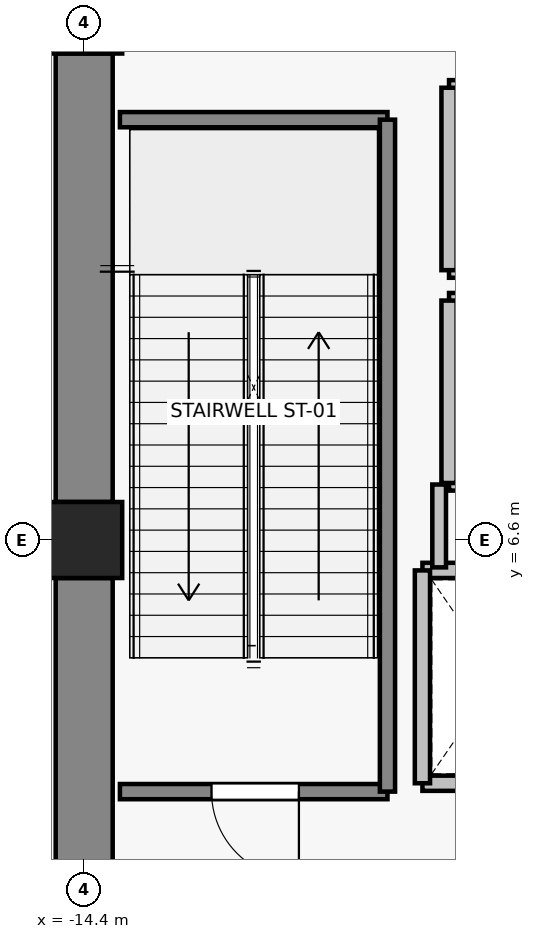
"""IFC4 building model, lengths in metres.
Left out: names, types, materials, properties, quantities, classifications, styles, units other than length and angle.
Written with IfcOpenShell. Run it as: python <this file> out.ifc"""

import sys

from ifc_helpers import new_model, si_unit, direction, frame, frame_2d, origin, origin_2d, place, context, subcontext, project, spatial, rectangle, extrude, source, transform, mapped, element, fill, save


model = new_model("IFC4")
c1 = context("Model", 3, precision=1e-05, world=origin(), true_north=direction((0.0, 1.0)))
c2 = subcontext(c1, "Body", "Model", "MODEL_VIEW")
j1 = project(units=[si_unit("LENGTHUNIT", "METRE"), si_unit("PLANEANGLEUNIT", "RADIAN")], contexts=[c1])
p1 = place(None, origin())
s1 = spatial("IfcSite", under=j1, at=p1, CompositionType="ELEMENT")
p2 = place(p1, origin())
s2 = spatial("IfcBuilding", under=s1, at=p2, CompositionType="ELEMENT")
p3 = place(p2, frame((0.0, 0.0, 80.2)))
s3 = spatial("IfcBuildingStorey", under=s2, at=p3, CompositionType="ELEMENT", Elevation=80.2)
for number, where, z_axis, x_axis in (
    (1, (-14.4, 6.6, 0.0), (0.0, 0.0, 1.0), (1.0, 0.0, 0.0)),
    (2, (-14.4, 13.5, 0.0), (0.0, 0.0, 1.0), (1.0, 0.0, 0.0)),
):
    element("IfcColumn", number, at=place(p3, frame(where, z_axis=z_axis, x_axis=x_axis)), inside=s3, PredefinedType="COLUMN", context=c2, shape_type="SweptSolid", body=[
        extrude(rectangle(XDim=1.0, YDim=1.0, at=origin_2d()), origin(), (0.0, 0.0, 1.0), 6.6),
    ])
p4 = place(p3, frame((-14.4, -0.7, 0.0), z_axis=(0.0, 0.0, 1.0), x_axis=(0.0, 1.0, 0.0)))
e3 = element("IfcWall", 3, at=p4, inside=s3, PredefinedType="SHEAR", context=c2, shape_type="SweptSolid", body=[
    extrude(rectangle(XDim=6.8, YDim=0.75, at=frame_2d((3.4, 0.0))), origin(), (0.0, 0.0, 1.0), 6.35),
])
p5 = place(p3, frame((-14.4, 7.1, 0.0), z_axis=(0.0, 0.0, 1.0), x_axis=(0.0, 1.0, 0.0)))
e4 = element("IfcWall", 4, at=p5, inside=s3, PredefinedType="SHEAR", context=c2, shape_type="SweptSolid", body=[
    extrude(rectangle(XDim=5.9, YDim=0.75, at=frame_2d((2.95, 0.0))), origin(), (0.0, 0.0, 1.0), 6.35),
])
p6 = place(p3, frame((-7.95, 3.4, 0.0), z_axis=(0.0, 0.0, 1.0), x_axis=(-1.0, 0.0, 0.0)))
e5 = element("IfcWall", 5, at=p6, inside=s3, PredefinedType="SOLIDWALL", context=c2, shape_type="SweptSolid", body=[
    extrude(rectangle(XDim=2.0, YDim=0.2, at=frame_2d((1.0, 0.0))), origin(), (0.0, 0.0, 1.0), 6.35),
])
p7 = place(p6, frame((0.45, 0.0, 0.0)))
e6 = element("IfcOpeningElement", 6, at=p7, cuts=e5, PredefinedType="OPENING", context=c2, shape_type="SweptSolid", body=[
    extrude(rectangle(XDim=1.1, YDim=2.2, at=frame_2d((0.55, 1.1))), frame((0.0, 0.11, 0.0), z_axis=(0.0, -1.0, 0.0), x_axis=(1.0, 0.0, 0.0)), (0.0, 0.0, 1.0), 0.22),
])
p8 = place(p3, frame((-9.95, 6.2, 0.0), z_axis=(0.0, 0.0, 1.0), x_axis=(1.0, 0.0, 0.0)))
e7 = element("IfcWall", 7, at=p8, inside=s3, PredefinedType="SOLIDWALL", context=c2, shape_type="SweptSolid", body=[
    extrude(rectangle(XDim=2.0, YDim=0.2, at=frame_2d((1.0, 0.0))), origin(), (0.0, 0.0, 1.0), 6.35),
])
p9 = place(p3, frame((-9.95, 3.4, 0.0), z_axis=(0.0, 0.0, 1.0), x_axis=(0.0, 1.0, 0.0)))
e8 = element("IfcWall", 8, at=p9, inside=s3, PredefinedType="SOLIDWALL", context=c2, shape_type="SweptSolid", body=[
    extrude(rectangle(XDim=2.8, YDim=0.2, at=frame_2d((1.4, 0.0))), origin(), (0.0, 0.0, 1.0), 6.35),
])
for number, where, z_axis, x_axis in (
    (9, (-7.4, 7.35, 0.0), (0.0, 0.0, 1.0), (-1.0, 0.0, 0.0)),
    (10, (-9.6, 9.75, 0.0), (0.0, 0.0, 1.0), (1.0, 0.0, 0.0)),
):
    element("IfcWall", number, at=place(p3, frame(where, z_axis=z_axis, x_axis=x_axis)), inside=s3, PredefinedType="SOLIDWALL", context=c2, shape_type="SweptSolid", body=[
        extrude(rectangle(XDim=2.2, YDim=0.2, at=frame_2d((1.1, 0.0))), origin(), (0.0, 0.0, 1.0), 5.79),
    ])
p10 = place(p3, frame((-9.6, 7.35, 0.0), z_axis=(0.0, 0.0, 1.0), x_axis=(0.0, 1.0, 0.0)))
e11 = element("IfcWall", 11, at=p10, inside=s3, PredefinedType="SOLIDWALL", context=c2, shape_type="SweptSolid", body=[
    extrude(rectangle(XDim=2.4, YDim=0.2, at=frame_2d((1.2, 0.0))), origin(), (0.0, 0.0, 1.0), 6.35),
])
for number, where, z_axis, x_axis in (
    (12, (-7.4, 10.15, 0.0), (0.0, 0.0, 1.0), (-1.0, 0.0, 0.0)),
    (13, (-9.6, 12.55, 0.0), (0.0, 0.0, 1.0), (1.0, 0.0, 0.0)),
):
    element("IfcWall", number, at=place(p3, frame(where, z_axis=z_axis, x_axis=x_axis)), inside=s3, PredefinedType="SOLIDWALL", context=c2, shape_type="SweptSolid", body=[
        extrude(rectangle(XDim=2.2, YDim=0.2, at=frame_2d((1.1, 0.0))), origin(), (0.0, 0.0, 1.0), 5.79),
    ])
p11 = place(p3, frame((-9.6, 10.15, 0.0), z_axis=(0.0, 0.0, 1.0), x_axis=(0.0, 1.0, 0.0)))
e14 = element("IfcWall", 14, at=p11, inside=s3, PredefinedType="SOLIDWALL", context=c2, shape_type="SweptSolid", body=[
    extrude(rectangle(XDim=2.4, YDim=0.2, at=frame_2d((1.2, 0.0))), origin(), (0.0, 0.0, 1.0), 6.35),
])
p12 = place(p3, frame((-10.41, 3.29, 0.0), z_axis=(0.0, 0.0, 1.0), x_axis=(-1.0, 0.0, 0.0)))
e15 = element("IfcWall", 15, at=p12, inside=s3, PredefinedType="SOLIDWALL", context=c2, shape_type="SweptSolid", body=[
    extrude(rectangle(XDim=3.52, YDim=0.2, at=frame_2d((1.76, 0.0))), origin(), (0.0, 0.0, 1.0), 6.35),
])
p13 = place(p12, frame((1.165, 0.0, 0.0)))
e16 = element("IfcOpeningElement", 16, at=p13, cuts=e15, PredefinedType="OPENING", context=c2, shape_type="SweptSolid", body=[
    extrude(rectangle(XDim=1.15, YDim=2.15, at=frame_2d((0.575, 1.075))), frame((0.0, 0.11, 0.0), z_axis=(0.0, -1.0, 0.0), x_axis=(1.0, 0.0, 0.0)), (0.0, 0.0, 1.0), 0.22),
])
p14 = place(p3, frame((-13.93, 12.13, 0.0), z_axis=(0.0, 0.0, 1.0), x_axis=(1.0, 0.0, 0.0)))
e17 = element("IfcWall", 17, at=p14, inside=s3, PredefinedType="SOLIDWALL", context=c2, shape_type="SweptSolid", body=[
    extrude(rectangle(XDim=3.52, YDim=0.2, at=frame_2d((1.76, 0.0))), origin(), (0.0, 0.0, 1.0), 6.35),
])
p15 = place(p3, frame((-10.41, 12.13, 0.0), z_axis=(0.0, 0.0, 1.0), x_axis=(0.0, -1.0, 0.0)))
e18 = element("IfcWall", 18, at=p15, inside=s3, PredefinedType="SOLIDWALL", context=c2, shape_type="SweptSolid", body=[
    extrude(rectangle(XDim=8.84, YDim=0.2, at=frame_2d((4.42, 0.0))), origin(), (0.0, 0.0, 1.0), 6.35),
])
p16 = place(p3, frame((-9.73, 6.24, 0.0), z_axis=(0.0, 0.0, 1.0), x_axis=(0.0, 1.0, 0.0)))
e19 = element("IfcWall", 19, at=p16, inside=s3, PredefinedType="PARTITIONING", context=c2, shape_type="SweptSolid", body=[
    extrude(rectangle(XDim=1.09, YDim=0.18, at=frame_2d((0.545, 0.0))), origin(), (0.0, 0.0, 1.0), 6.35),
])
m1 = source(origin(), c2, "Body", "SweptSolid", [
    extrude(rectangle(XDim=1.15, YDim=2.15, at=frame_2d((0.575, 1.075))), frame((0.0, 0.025, 0.0), z_axis=(0.0, -1.0, 0.0), x_axis=(1.0, 0.0, 0.0)), (0.0, 0.0, 1.0), 0.05),
])
p17 = place(p13, origin())
e20 = element("IfcDoor", 20, at=p17, inside=s3, OperationType="SINGLE_SWING_LEFT", PredefinedType="DOOR", context=c2, shape_type="MappedRepresentation", body=[
    mapped(m1, transform((0.0, 0.0, 0.0), x_axis=(1.0, 0.0, 0.0), y_axis=(0.0, 1.0, 0.0), z_axis=(0.0, 0.0, 1.0), scale=1.0)),
])
fill(e16, e20)
save(model, sys.argv[1])
